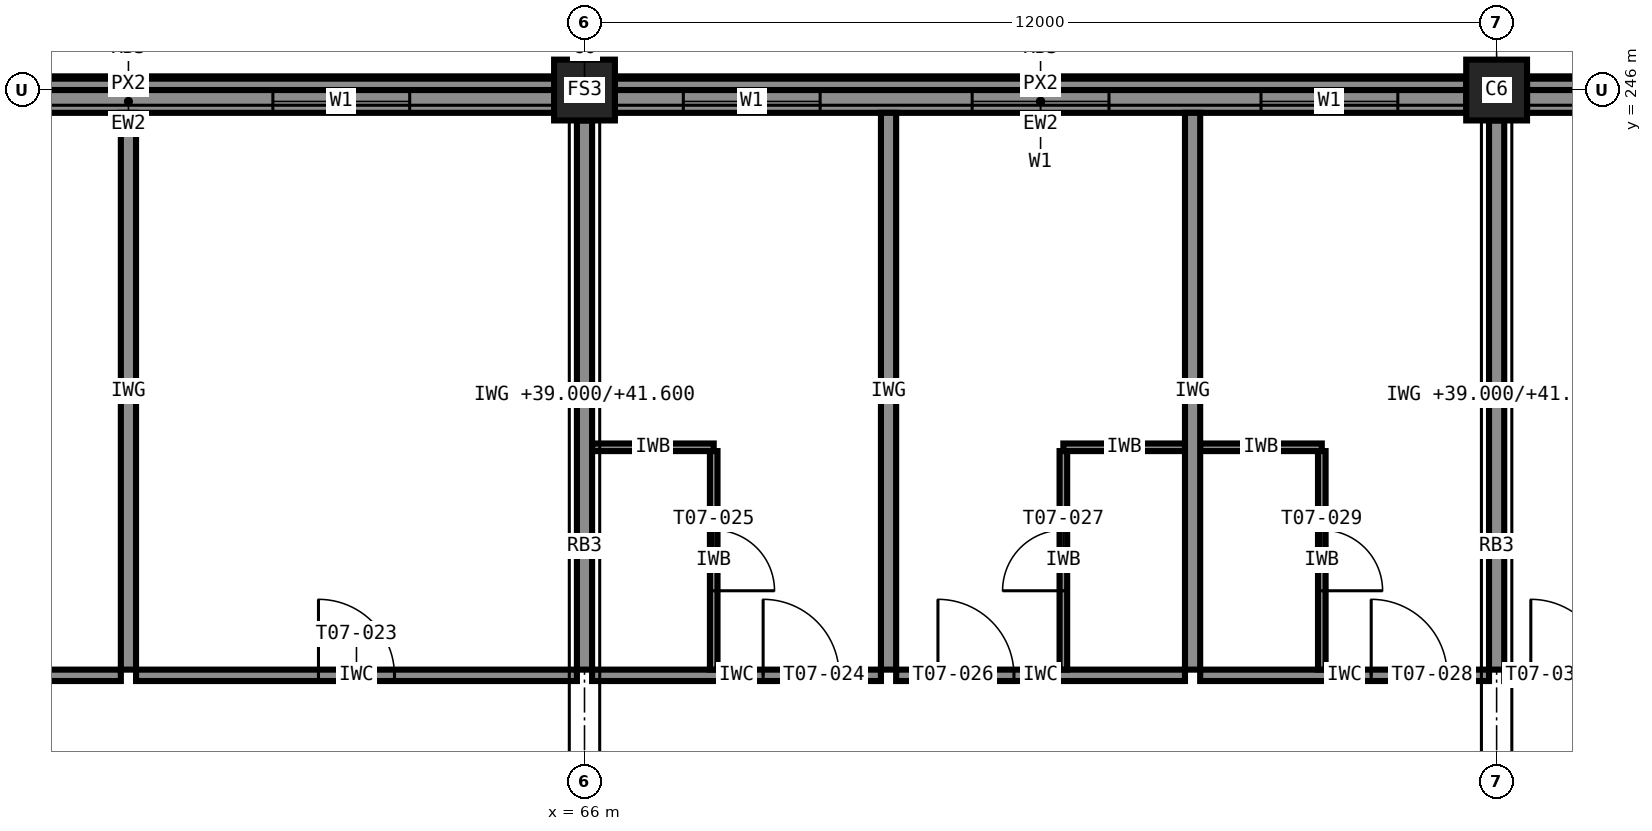
"""IFC4 building model, lengths in metres.
Left out: names, types, materials, properties, quantities, classifications, styles, units other than length and angle.
Written with IfcOpenShell. Run it as: python <this file> out.ifc"""

import sys

from ifc_helpers import new_model, si_unit, direction, frame, frame_2d, origin, origin_2d, place, context, subcontext, project, spatial, rectangle, extrude, element, fill, save


model = new_model("IFC4")
c1 = context("Model", 3, precision=1e-05, world=origin(), true_north=direction((0.0, 1.0)))
c2 = subcontext(c1, "Body", "Model", "MODEL_VIEW")
j1 = project(units=[si_unit("LENGTHUNIT", "METRE"), si_unit("PLANEANGLEUNIT", "RADIAN")], contexts=[c1])
p1 = place(None, origin())
s1 = spatial("IfcSite", under=j1, at=p1, CompositionType="ELEMENT")
p2 = place(p1, origin())
s2 = spatial("IfcBuilding", under=s1, at=p2, CompositionType="ELEMENT")
p3 = place(p2, frame((0.0, 0.0, 39.0)))
s3 = spatial("IfcBuildingStorey", under=s2, at=p3, CompositionType="ELEMENT", Elevation=39.0)
for number, where, z_axis, x_axis in (
    (1, (66.0, 246.0, 0.0), (0.0, 0.0, 1.0), (1.0, 0.0, 0.0)),
    (2, (78.0, 246.0, 0.0), (0.0, 0.0, 1.0), (1.0, 0.0, 0.0)),
):
    element("IfcColumn", number, at=place(p3, frame(where, z_axis=z_axis, x_axis=x_axis)), inside=s3, PredefinedType="COLUMN", context=c2, shape_type="SweptSolid", body=[
        extrude(rectangle(XDim=0.8, YDim=0.8, at=origin_2d()), origin(), (0.0, 0.0, 1.0), 3.6),
    ])
p4 = place(p3, frame((89.6, 245.85, 0.0), z_axis=(0.0, 0.0, 1.0), x_axis=(-1.0, 0.0, 0.0)))
e3 = element("IfcWall", 3, at=p4, inside=s3, PredefinedType="STANDARD", context=c2, shape_type="SweptSolid", body=[
    extrude(rectangle(XDim=11.2, YDim=0.3, at=frame_2d((5.6, 0.0))), origin(), (0.0, 0.0, 1.0), 2.6),
])
p5 = place(p4, frame((8.7, 0.0, 0.85)))
e4 = element("IfcOpeningElement", 4, at=p5, cuts=e3, PredefinedType="OPENING", context=c2, shape_type="SweptSolid", body=[
    extrude(rectangle(XDim=1.8, YDim=1.75, at=frame_2d((0.9, 0.875))), frame((0.0, 0.16, 0.0), z_axis=(0.0, -1.0, 0.0), x_axis=(1.0, 0.0, 0.0)), (0.0, 0.0, 1.0), 0.32),
])
p6 = place(p4, frame((4.9, 0.0, 0.85)))
e5 = element("IfcOpeningElement", 5, at=p6, cuts=e3, PredefinedType="OPENING", context=c2, shape_type="SweptSolid", body=[
    extrude(rectangle(XDim=1.8, YDim=1.75, at=frame_2d((0.9, 0.875))), frame((0.0, 0.16, 0.0), z_axis=(0.0, -1.0, 0.0), x_axis=(1.0, 0.0, 0.0)), (0.0, 0.0, 1.0), 0.32),
])
p7 = place(p4, frame((0.95, 0.0, 0.85)))
e6 = element("IfcOpeningElement", 6, at=p7, cuts=e3, PredefinedType="OPENING", context=c2, shape_type="SweptSolid", body=[
    extrude(rectangle(XDim=1.8, YDim=1.75, at=frame_2d((0.9, 0.875))), frame((0.0, 0.16, 0.0), z_axis=(0.0, -1.0, 0.0), x_axis=(1.0, 0.0, 0.0)), (0.0, 0.0, 1.0), 0.32),
])
p8 = place(p3, frame((77.6, 245.85, 0.0), z_axis=(0.0, 0.0, 1.0), x_axis=(-1.0, 0.0, 0.0)))
e7 = element("IfcWall", 7, at=p8, inside=s3, PredefinedType="STANDARD", context=c2, shape_type="SweptSolid", body=[
    extrude(rectangle(XDim=11.2, YDim=0.3, at=frame_2d((5.6, 0.0))), origin(), (0.0, 0.0, 1.0), 2.6),
])
p9 = place(p8, frame((8.5, 0.0, 0.85)))
e8 = element("IfcOpeningElement", 8, at=p9, cuts=e7, PredefinedType="OPENING", context=c2, shape_type="SweptSolid", body=[
    extrude(rectangle(XDim=1.8, YDim=1.75, at=frame_2d((0.9, 0.875))), frame((0.0, 0.16, 0.0), z_axis=(0.0, -1.0, 0.0), x_axis=(1.0, 0.0, 0.0)), (0.0, 0.0, 1.0), 0.32),
])
p10 = place(p8, frame((4.7, 0.0, 0.85)))
e9 = element("IfcOpeningElement", 9, at=p10, cuts=e7, PredefinedType="OPENING", context=c2, shape_type="SweptSolid", body=[
    extrude(rectangle(XDim=1.8, YDim=1.75, at=frame_2d((0.9, 0.875))), frame((0.0, 0.16, 0.0), z_axis=(0.0, -1.0, 0.0), x_axis=(1.0, 0.0, 0.0)), (0.0, 0.0, 1.0), 0.32),
])
p11 = place(p8, frame((0.9, 0.0, 0.85)))
e10 = element("IfcOpeningElement", 10, at=p11, cuts=e7, PredefinedType="OPENING", context=c2, shape_type="SweptSolid", body=[
    extrude(rectangle(XDim=1.8, YDim=1.75, at=frame_2d((0.9, 0.875))), frame((0.0, 0.16, 0.0), z_axis=(0.0, -1.0, 0.0), x_axis=(1.0, 0.0, 0.0)), (0.0, 0.0, 1.0), 0.32),
])
p12 = place(p3, frame((65.6, 245.85, 0.0), z_axis=(0.0, 0.0, 1.0), x_axis=(-1.0, 0.0, 0.0)))
e11 = element("IfcWall", 11, at=p12, inside=s3, PredefinedType="STANDARD", context=c2, shape_type="SweptSolid", body=[
    extrude(rectangle(XDim=11.2, YDim=0.3, at=frame_2d((5.6, 0.0))), origin(), (0.0, 0.0, 1.0), 2.6),
])
p13 = place(p12, frame((7.5, 0.0, 0.85)))
e12 = element("IfcOpeningElement", 12, at=p13, cuts=e11, PredefinedType="OPENING", context=c2, shape_type="SweptSolid", body=[
    extrude(rectangle(XDim=1.8, YDim=1.75, at=frame_2d((0.9, 0.875))), frame((0.0, 0.16, 0.0), z_axis=(0.0, -1.0, 0.0), x_axis=(1.0, 0.0, 0.0)), (0.0, 0.0, 1.0), 0.32),
])
p14 = place(p12, frame((1.9, 0.0, 0.85)))
e13 = element("IfcOpeningElement", 13, at=p14, cuts=e11, PredefinedType="OPENING", context=c2, shape_type="SweptSolid", body=[
    extrude(rectangle(XDim=1.8, YDim=1.75, at=frame_2d((0.9, 0.875))), frame((0.0, 0.16, 0.0), z_axis=(0.0, -1.0, 0.0), x_axis=(1.0, 0.0, 0.0)), (0.0, 0.0, 1.0), 0.32),
])
for number, where, z_axis, x_axis in (
    (14, (89.6, 246.075, 3.4), (0.0, 0.0, 1.0), (-1.0, 0.0, 0.0)),
    (15, (77.6, 246.075, 3.4), (0.0, 0.0, 1.0), (-1.0, 0.0, 0.0)),
    (16, (65.6, 246.075, 3.4), (0.0, 0.0, 1.0), (-1.0, 0.0, 0.0)),
):
    element("IfcWall", number, at=place(p3, frame(where, z_axis=z_axis, x_axis=x_axis)), inside=s3, PredefinedType="STANDARD", context=c2, shape_type="SweptSolid", body=[
        extrude(rectangle(XDim=11.2, YDim=0.15, at=frame_2d((5.6, 0.0))), origin(), (0.0, 0.0, 1.0), 0.2),
    ])
p15 = place(p3, frame((54.1, 238.3, 0.0), z_axis=(0.0, 0.0, 1.0), x_axis=(1.0, 0.0, 0.0)))
e17 = element("IfcWall", 17, at=p15, inside=s3, PredefinedType="PARTITIONING", context=c2, shape_type="SweptSolid", body=[
    extrude(rectangle(XDim=5.8, YDim=0.15, at=frame_2d((2.9, 0.0))), origin(), (0.0, 0.0, 1.0), 3.4),
])
p16 = place(p15, frame((2.4, 0.0, 0.0)))
e18 = element("IfcOpeningElement", 18, at=p16, cuts=e17, PredefinedType="OPENING", context=c2, shape_type="SweptSolid", body=[
    extrude(rectangle(XDim=1.0, YDim=2.1, at=frame_2d((0.5, 1.05))), frame((0.0, 0.085, 0.0), z_axis=(0.0, -1.0, 0.0), x_axis=(1.0, 0.0, 0.0)), (0.0, 0.0, 1.0), 0.17),
])
p17 = place(p3, frame((60.1, 238.3, 0.0), z_axis=(0.0, 0.0, 1.0), x_axis=(1.0, 0.0, 0.0)))
e19 = element("IfcWall", 19, at=p17, inside=s3, PredefinedType="PARTITIONING", context=c2, shape_type="SweptSolid", body=[
    extrude(rectangle(XDim=5.8, YDim=0.15, at=frame_2d((2.9, 0.0))), origin(), (0.0, 0.0, 1.0), 3.4),
])
p18 = place(p17, frame((2.4, 0.0, 0.0)))
e20 = element("IfcOpeningElement", 20, at=p18, cuts=e19, PredefinedType="OPENING", context=c2, shape_type="SweptSolid", body=[
    extrude(rectangle(XDim=1.0, YDim=2.1, at=frame_2d((0.5, 1.05))), frame((0.0, 0.085, 0.0), z_axis=(0.0, -1.0, 0.0), x_axis=(1.0, 0.0, 0.0)), (0.0, 0.0, 1.0), 0.17),
])
p19 = place(p3, frame((66.1, 238.3, 0.0), z_axis=(0.0, 0.0, 1.0), x_axis=(1.0, 0.0, 0.0)))
e21 = element("IfcWall", 21, at=p19, inside=s3, PredefinedType="PARTITIONING", context=c2, shape_type="SweptSolid", body=[
    extrude(rectangle(XDim=3.8, YDim=0.15, at=frame_2d((1.9, 0.0))), origin(), (0.0, 0.0, 1.0), 3.4),
])
p20 = place(p19, frame((2.25, 0.0, 0.0)))
e22 = element("IfcOpeningElement", 22, at=p20, cuts=e21, PredefinedType="OPENING", context=c2, shape_type="SweptSolid", body=[
    extrude(rectangle(XDim=1.0, YDim=2.1, at=frame_2d((0.5, 1.05))), frame((0.0, 0.085, 0.0), z_axis=(0.0, -1.0, 0.0), x_axis=(1.0, 0.0, 0.0)), (0.0, 0.0, 1.0), 0.17),
])
p21 = place(p3, frame((66.1, 241.3, 0.0), z_axis=(0.0, 0.0, 1.0), x_axis=(1.0, 0.0, 0.0)))
e23 = element("IfcWall", 23, at=p21, inside=s3, PredefinedType="PARTITIONING", context=c2, shape_type="SweptSolid", body=[
    extrude(rectangle(XDim=1.6, YDim=0.1, at=frame_2d((0.8, 0.0))), origin(), (0.0, 0.0, 1.0), 3.4),
])
p22 = place(p3, frame((67.7, 241.25, 0.0), z_axis=(0.0, 0.0, 1.0), x_axis=(0.0, -1.0, 0.0)))
e24 = element("IfcWall", 24, at=p22, inside=s3, PredefinedType="PARTITIONING", context=c2, shape_type="SweptSolid", body=[
    extrude(rectangle(XDim=2.875, YDim=0.1, at=frame_2d((1.438, 0.0))), origin(), (0.0, 0.0, 1.0), 3.4),
])
p23 = place(p22, frame((1.038, 0.0, 0.0)))
e25 = element("IfcOpeningElement", 25, at=p23, cuts=e24, PredefinedType="OPENING", context=c2, shape_type="SweptSolid", body=[
    extrude(rectangle(XDim=0.8, YDim=2.1, at=frame_2d((0.4, 1.05))), frame((0.0, 0.06, 0.0), z_axis=(0.0, -1.0, 0.0), x_axis=(1.0, 0.0, 0.0)), (0.0, 0.0, 1.0), 0.12),
])
p24 = place(p3, frame((70.1, 238.3, 0.0), z_axis=(0.0, 0.0, 1.0), x_axis=(1.0, 0.0, 0.0)))
e26 = element("IfcWall", 26, at=p24, inside=s3, PredefinedType="PARTITIONING", context=c2, shape_type="SweptSolid", body=[
    extrude(rectangle(XDim=3.8, YDim=0.15, at=frame_2d((1.9, 0.0))), origin(), (0.0, 0.0, 1.0), 3.4),
])
p25 = place(p24, frame((0.55, 0.0, 0.0)))
e27 = element("IfcOpeningElement", 27, at=p25, cuts=e26, PredefinedType="OPENING", context=c2, shape_type="SweptSolid", body=[
    extrude(rectangle(XDim=1.0, YDim=2.1, at=frame_2d((0.5, 1.05))), frame((0.0, 0.085, 0.0), z_axis=(0.0, -1.0, 0.0), x_axis=(1.0, 0.0, 0.0)), (0.0, 0.0, 1.0), 0.17),
])
p26 = place(p3, frame((72.3, 241.3, 0.0), z_axis=(0.0, 0.0, 1.0), x_axis=(1.0, 0.0, 0.0)))
e28 = element("IfcWall", 28, at=p26, inside=s3, PredefinedType="PARTITIONING", context=c2, shape_type="SweptSolid", body=[
    extrude(rectangle(XDim=1.6, YDim=0.1, at=frame_2d((0.8, 0.0))), origin(), (0.0, 0.0, 1.0), 3.4),
])
p27 = place(p3, frame((72.3, 238.375, 0.0), z_axis=(0.0, 0.0, 1.0), x_axis=(0.0, 1.0, 0.0)))
e29 = element("IfcWall", 29, at=p27, inside=s3, PredefinedType="PARTITIONING", context=c2, shape_type="SweptSolid", body=[
    extrude(rectangle(XDim=2.875, YDim=0.1, at=frame_2d((1.438, 0.0))), origin(), (0.0, 0.0, 1.0), 3.4),
])
p28 = place(p27, frame((1.038, 0.0, 0.0)))
e30 = element("IfcOpeningElement", 30, at=p28, cuts=e29, PredefinedType="OPENING", context=c2, shape_type="SweptSolid", body=[
    extrude(rectangle(XDim=0.8, YDim=2.1, at=frame_2d((0.4, 1.05))), frame((0.0, 0.06, 0.0), z_axis=(0.0, -1.0, 0.0), x_axis=(1.0, 0.0, 0.0)), (0.0, 0.0, 1.0), 0.12),
])
p29 = place(p3, frame((74.1, 238.3, 0.0), z_axis=(0.0, 0.0, 1.0), x_axis=(1.0, 0.0, 0.0)))
e31 = element("IfcWall", 31, at=p29, inside=s3, PredefinedType="PARTITIONING", context=c2, shape_type="SweptSolid", body=[
    extrude(rectangle(XDim=3.8, YDim=0.15, at=frame_2d((1.9, 0.0))), origin(), (0.0, 0.0, 1.0), 3.4),
])
p30 = place(p29, frame((2.25, 0.0, 0.0)))
e32 = element("IfcOpeningElement", 32, at=p30, cuts=e31, PredefinedType="OPENING", context=c2, shape_type="SweptSolid", body=[
    extrude(rectangle(XDim=1.0, YDim=2.1, at=frame_2d((0.5, 1.05))), frame((0.0, 0.085, 0.0), z_axis=(0.0, -1.0, 0.0), x_axis=(1.0, 0.0, 0.0)), (0.0, 0.0, 1.0), 0.17),
])
p31 = place(p3, frame((74.1, 241.3, 0.0), z_axis=(0.0, 0.0, 1.0), x_axis=(1.0, 0.0, 0.0)))
e33 = element("IfcWall", 33, at=p31, inside=s3, PredefinedType="PARTITIONING", context=c2, shape_type="SweptSolid", body=[
    extrude(rectangle(XDim=1.6, YDim=0.1, at=frame_2d((0.8, 0.0))), origin(), (0.0, 0.0, 1.0), 3.4),
])
p32 = place(p3, frame((75.7, 241.25, 0.0), z_axis=(0.0, 0.0, 1.0), x_axis=(0.0, -1.0, 0.0)))
e34 = element("IfcWall", 34, at=p32, inside=s3, PredefinedType="PARTITIONING", context=c2, shape_type="SweptSolid", body=[
    extrude(rectangle(XDim=2.875, YDim=0.1, at=frame_2d((1.438, 0.0))), origin(), (0.0, 0.0, 1.0), 3.4),
])
p33 = place(p32, frame((1.038, 0.0, 0.0)))
e35 = element("IfcOpeningElement", 35, at=p33, cuts=e34, PredefinedType="OPENING", context=c2, shape_type="SweptSolid", body=[
    extrude(rectangle(XDim=0.8, YDim=2.1, at=frame_2d((0.4, 1.05))), frame((0.0, 0.06, 0.0), z_axis=(0.0, -1.0, 0.0), x_axis=(1.0, 0.0, 0.0)), (0.0, 0.0, 1.0), 0.12),
])
p34 = place(p3, frame((78.1, 238.3, 0.0), z_axis=(0.0, 0.0, 1.0), x_axis=(1.0, 0.0, 0.0)))
e36 = element("IfcWall", 36, at=p34, inside=s3, PredefinedType="PARTITIONING", context=c2, shape_type="SweptSolid", body=[
    extrude(rectangle(XDim=3.4, YDim=0.15, at=frame_2d((1.7, 0.0))), origin(), (0.0, 0.0, 1.0), 3.4),
])
p35 = place(p34, frame((0.35, 0.0, 0.0)))
e37 = element("IfcOpeningElement", 37, at=p35, cuts=e36, PredefinedType="OPENING", context=c2, shape_type="SweptSolid", body=[
    extrude(rectangle(XDim=1.0, YDim=2.1, at=frame_2d((0.5, 1.05))), frame((0.0, 0.085, 0.0), z_axis=(0.0, -1.0, 0.0), x_axis=(1.0, 0.0, 0.0)), (0.0, 0.0, 1.0), 0.17),
])
p36 = place(p3, frame((60.0, 245.7, 0.0), z_axis=(0.0, 0.0, 1.0), x_axis=(0.0, -1.0, 0.0)))
e38 = element("IfcWall", 38, at=p36, inside=s3, PredefinedType="PARTITIONING", context=c2, shape_type="SweptSolid", body=[
    extrude(rectangle(XDim=7.325, YDim=0.2, at=frame_2d((3.663, 0.0))), origin(), (0.0, 0.0, 1.0), 3.4),
])
p37 = place(p3, frame((66.0, 245.6, 0.0), z_axis=(0.0, 0.0, 1.0), x_axis=(0.0, -1.0, 0.0)))
e39 = element("IfcWall", 39, at=p37, inside=s3, PredefinedType="PARTITIONING", context=c2, shape_type="SweptSolid", body=[
    extrude(rectangle(XDim=7.225, YDim=0.2, at=frame_2d((3.613, 0.0))), origin(), (0.0, 0.0, 1.0), 2.6),
])
for number, where, z_axis, x_axis in (
    (40, (70.0, 245.7, 0.0), (0.0, 0.0, 1.0), (0.0, -1.0, 0.0)),
    (41, (74.0, 245.7, 0.0), (0.0, 0.0, 1.0), (0.0, -1.0, 0.0)),
):
    element("IfcWall", number, at=place(p3, frame(where, z_axis=z_axis, x_axis=x_axis)), inside=s3, PredefinedType="PARTITIONING", context=c2, shape_type="SweptSolid", body=[
        extrude(rectangle(XDim=7.325, YDim=0.2, at=frame_2d((3.663, 0.0))), origin(), (0.0, 0.0, 1.0), 3.4),
    ])
p38 = place(p3, frame((78.0, 245.6, 0.0), z_axis=(0.0, 0.0, 1.0), x_axis=(0.0, -1.0, 0.0)))
e42 = element("IfcWall", 42, at=p38, inside=s3, PredefinedType="PARTITIONING", context=c2, shape_type="SweptSolid", body=[
    extrude(rectangle(XDim=7.225, YDim=0.2, at=frame_2d((3.613, 0.0))), origin(), (0.0, 0.0, 1.0), 2.6),
])
p39 = place(p9, origin())
e43 = element("IfcWindow", 43, at=p39, inside=s3, PartitioningType="SINGLE_PANEL", PredefinedType="WINDOW", context=c2, shape_type="SweptSolid", body=[
    extrude(rectangle(XDim=1.8, YDim=1.75, at=frame_2d((0.9, 0.875))), frame((0.0, 0.03, 0.0), z_axis=(0.0, -1.0, 0.0), x_axis=(1.0, 0.0, 0.0)), (0.0, 0.0, 1.0), 0.06),
])
fill(e8, e43)
p40 = place(p10, origin())
e44 = element("IfcWindow", 44, at=p40, inside=s3, PartitioningType="SINGLE_PANEL", PredefinedType="WINDOW", context=c2, shape_type="SweptSolid", body=[
    extrude(rectangle(XDim=1.8, YDim=1.75, at=frame_2d((0.9, 0.875))), frame((0.0, 0.03, 0.0), z_axis=(0.0, -1.0, 0.0), x_axis=(1.0, 0.0, 0.0)), (0.0, 0.0, 1.0), 0.06),
])
fill(e9, e44)
p41 = place(p11, origin())
e45 = element("IfcWindow", 45, at=p41, inside=s3, PartitioningType="SINGLE_PANEL", PredefinedType="WINDOW", context=c2, shape_type="SweptSolid", body=[
    extrude(rectangle(XDim=1.8, YDim=1.75, at=frame_2d((0.9, 0.875))), frame((0.0, 0.03, 0.0), z_axis=(0.0, -1.0, 0.0), x_axis=(1.0, 0.0, 0.0)), (0.0, 0.0, 1.0), 0.06),
])
fill(e10, e45)
p42 = place(p14, origin())
e46 = element("IfcWindow", 46, at=p42, inside=s3, PartitioningType="SINGLE_PANEL", PredefinedType="WINDOW", context=c2, shape_type="SweptSolid", body=[
    extrude(rectangle(XDim=1.8, YDim=1.75, at=frame_2d((0.9, 0.875))), frame((0.0, 0.03, 0.0), z_axis=(0.0, -1.0, 0.0), x_axis=(1.0, 0.0, 0.0)), (0.0, 0.0, 1.0), 0.06),
])
fill(e13, e46)
p43 = place(p18, origin())
e47 = element("IfcDoor", 47, at=p43, inside=s3, OperationType="SINGLE_SWING_LEFT", PredefinedType="DOOR", context=c2, shape_type="SweptSolid", body=[
    extrude(rectangle(XDim=1.0, YDim=2.1, at=frame_2d((0.5, 1.05))), frame((0.0, 0.025, 0.0), z_axis=(0.0, -1.0, 0.0), x_axis=(1.0, 0.0, 0.0)), (0.0, 0.0, 1.0), 0.05),
])
fill(e20, e47)
p44 = place(p20, origin())
e48 = element("IfcDoor", 48, at=p44, inside=s3, OperationType="SINGLE_SWING_LEFT", PredefinedType="DOOR", context=c2, shape_type="SweptSolid", body=[
    extrude(rectangle(XDim=1.0, YDim=2.1, at=frame_2d((0.5, 1.05))), frame((0.0, 0.025, 0.0), z_axis=(0.0, -1.0, 0.0), x_axis=(1.0, 0.0, 0.0)), (0.0, 0.0, 1.0), 0.05),
])
fill(e22, e48)
p45 = place(p23, origin())
e49 = element("IfcDoor", 49, at=p45, inside=s3, OperationType="SINGLE_SWING_RIGHT", PredefinedType="DOOR", context=c2, shape_type="SweptSolid", body=[
    extrude(rectangle(XDim=0.8, YDim=2.1, at=frame_2d((0.4, 1.05))), frame((0.0, 0.025, 0.0), z_axis=(0.0, -1.0, 0.0), x_axis=(1.0, 0.0, 0.0)), (0.0, 0.0, 1.0), 0.05),
])
fill(e25, e49)
p46 = place(p25, origin())
e50 = element("IfcDoor", 50, at=p46, inside=s3, OperationType="SINGLE_SWING_LEFT", PredefinedType="DOOR", context=c2, shape_type="SweptSolid", body=[
    extrude(rectangle(XDim=1.0, YDim=2.1, at=frame_2d((0.5, 1.05))), frame((0.0, 0.025, 0.0), z_axis=(0.0, -1.0, 0.0), x_axis=(1.0, 0.0, 0.0)), (0.0, 0.0, 1.0), 0.05),
])
fill(e27, e50)
p47 = place(p28, origin())
e51 = element("IfcDoor", 51, at=p47, inside=s3, OperationType="SINGLE_SWING_LEFT", PredefinedType="DOOR", context=c2, shape_type="SweptSolid", body=[
    extrude(rectangle(XDim=0.8, YDim=2.1, at=frame_2d((0.4, 1.05))), frame((0.0, 0.025, 0.0), z_axis=(0.0, -1.0, 0.0), x_axis=(1.0, 0.0, 0.0)), (0.0, 0.0, 1.0), 0.05),
])
fill(e30, e51)
p48 = place(p30, origin())
e52 = element("IfcDoor", 52, at=p48, inside=s3, OperationType="SINGLE_SWING_LEFT", PredefinedType="DOOR", context=c2, shape_type="SweptSolid", body=[
    extrude(rectangle(XDim=1.0, YDim=2.1, at=frame_2d((0.5, 1.05))), frame((0.0, 0.025, 0.0), z_axis=(0.0, -1.0, 0.0), x_axis=(1.0, 0.0, 0.0)), (0.0, 0.0, 1.0), 0.05),
])
fill(e32, e52)
p49 = place(p33, origin())
e53 = element("IfcDoor", 53, at=p49, inside=s3, OperationType="SINGLE_SWING_RIGHT", PredefinedType="DOOR", context=c2, shape_type="SweptSolid", body=[
    extrude(rectangle(XDim=0.8, YDim=2.1, at=frame_2d((0.4, 1.05))), frame((0.0, 0.025, 0.0), z_axis=(0.0, -1.0, 0.0), x_axis=(1.0, 0.0, 0.0)), (0.0, 0.0, 1.0), 0.05),
])
fill(e35, e53)
p50 = place(p35, origin())
e54 = element("IfcDoor", 54, at=p50, inside=s3, OperationType="SINGLE_SWING_LEFT", PredefinedType="DOOR", context=c2, shape_type="SweptSolid", body=[
    extrude(rectangle(XDim=1.0, YDim=2.1, at=frame_2d((0.5, 1.05))), frame((0.0, 0.025, 0.0), z_axis=(0.0, -1.0, 0.0), x_axis=(1.0, 0.0, 0.0)), (0.0, 0.0, 1.0), 0.05),
])
fill(e37, e54)
save(model, sys.argv[1])
